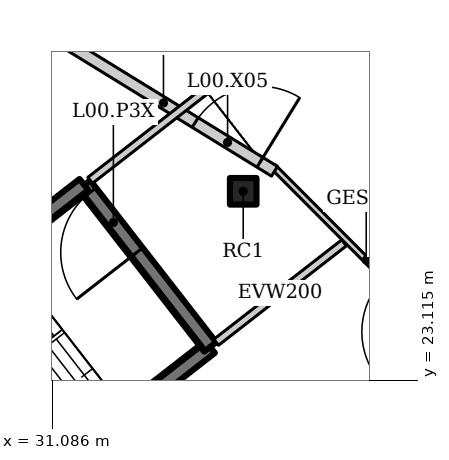
"""IFC4 building model, lengths in metres.
Left out: names, types, materials, properties, quantities, classifications, styles, units other than length and angle.
Written with IfcOpenShell. Run it as: python <this file> out.ifc"""

import sys

from ifc_helpers import new_model, si_unit, direction, frame, frame_2d, origin, origin_2d, place, context, subcontext, project, spatial, rectangle, hollow_rectangle, extrude, element, fill, save


model = new_model("IFC4")
c1 = context("Model", 3, precision=1e-05, world=origin(), true_north=direction((0.0, 1.0)))
c2 = subcontext(c1, "Body", "Model", "MODEL_VIEW")
j1 = project(units=[si_unit("LENGTHUNIT", "METRE"), si_unit("PLANEANGLEUNIT", "RADIAN")], contexts=[c1])
p1 = place(None, origin())
s1 = spatial("IfcSite", under=j1, at=p1, CompositionType="ELEMENT")
p2 = place(p1, origin())
s2 = spatial("IfcBuilding", under=s1, at=p2, CompositionType="ELEMENT")
p3 = place(p2, origin())
s3 = spatial("IfcBuildingStorey", under=s2, at=p3, CompositionType="ELEMENT", Elevation=0.0)
p4 = place(p3, frame((36.108, 28.081, 0.0), z_axis=(0.0, 0.0, 1.0), x_axis=(1.0, 0.0, 0.0)))
e1 = element("IfcColumn", 1, at=p4, inside=s3, PredefinedType="COLUMN", context=c2, shape_type="SweptSolid", body=[
    extrude(hollow_rectangle(XDim=0.7, YDim=0.7, WallThickness=0.04, at=origin_2d()), origin(), (0.0, 0.0, 1.0), 6.5),
])
p5 = place(p3, frame((41.794, 23.815, 0.0), z_axis=(0.0, 0.0, 1.0), x_axis=(-0.705874614645, 0.708336804352, 0.0)))
e2 = element("IfcWall", 2, at=p5, inside=s3, PredefinedType="ELEMENTEDWALL", context=c2, shape_type="SweptSolid", body=[
    extrude(rectangle(XDim=6.941, YDim=0.15, at=frame_2d((3.47, 0.0))), origin(), (0.0, 0.0, 1.0), 6.3),
])
p6 = place(p5, frame((0.8, 0.0, 0.0)))
e3 = element("IfcOpeningElement", 3, at=p6, cuts=e2, PredefinedType="OPENING", context=c2, shape_type="SweptSolid", body=[
    extrude(rectangle(XDim=2.0, YDim=2.4, at=frame_2d((1.0, 1.2))), frame((0.0, 0.085, 0.0), z_axis=(0.0, -1.0, 0.0), x_axis=(1.0, 0.0, 0.0)), (0.0, 0.0, 1.0), 0.17),
])
p7 = place(p3, frame((36.932, 28.608, 0.0), z_axis=(0.0, 0.0, 1.0), x_axis=(-0.851808565246, 0.52385319334, 0.0)))
e4 = element("IfcWall", 4, at=p7, inside=s3, PredefinedType="SOLIDWALL", context=c2, shape_type="SweptSolid", body=[
    extrude(rectangle(XDim=6.861, YDim=0.3, at=frame_2d((3.43, 0.0))), origin(), (0.0, 0.0, 1.0), 6.3),
])
p8 = place(p7, frame((0.45, 0.0, 0.0)))
e5 = element("IfcOpeningElement", 5, at=p8, cuts=e4, PredefinedType="OPENING", context=c2, shape_type="SweptSolid", body=[
    extrude(rectangle(XDim=2.0, YDim=2.1, at=frame_2d((1.0, 1.05))), frame((0.0, 0.16, 0.0), z_axis=(0.0, -1.0, 0.0), x_axis=(1.0, 0.0, 0.0)), (0.0, 0.0, 1.0), 0.32),
])
p9 = place(p3, frame((35.397, 24.108, 0.0), z_axis=(0.0, 0.0, 1.0), x_axis=(0.789352217376, 0.613940613515, 0.0)))
e6 = element("IfcWall", 6, at=p9, inside=s3, PredefinedType="SOLIDWALL", context=c2, shape_type="SweptSolid", body=[
    extrude(rectangle(XDim=4.262, YDim=0.2, at=frame_2d((2.131, 0.0))), origin(), (0.0, 0.0, 1.0), 6.3),
])
p10 = place(p3, frame((32.082, 28.371, 0.0), z_axis=(0.0, 0.0, 1.0), x_axis=(0.789376118937, 0.613909881702, 0.0)))
e7 = element("IfcWall", 7, at=p10, inside=s3, PredefinedType="SOLIDWALL", context=c2, shape_type="SweptSolid", body=[
    extrude(rectangle(XDim=3.85, YDim=0.2, at=frame_2d((1.925, 0.0))), origin(), (0.0, 0.0, 1.0), 6.3),
])
p11 = place(p3, frame((17.291, 17.905, 0.0), z_axis=(0.0, 0.0, 1.0), x_axis=(0.696460684513, 0.717594951855, 0.0)))
e8 = element("IfcWall", 8, at=p11, inside=s3, PredefinedType="SOLIDWALL", context=c2, shape_type="SweptSolid", body=[
    extrude(rectangle(XDim=19.881, YDim=0.2, at=frame_2d((9.94, 0.0))), origin(), (0.0, 0.0, 1.0), 4.8),
])
p12 = place(p3, frame((28.293, 18.583, 0.0), z_axis=(0.0, 0.0, 1.0), x_axis=(0.78938060008, 0.613904119726, 0.0)))
e9 = element("IfcWall", 9, at=p12, inside=s3, PredefinedType="SHEAR", context=c2, shape_type="SweptSolid", body=[
    extrude(rectangle(XDim=8.8, YDim=0.4, at=frame_2d((4.4, 0.0))), origin(), (0.0, 0.0, 1.0), 6.5),
])
p13 = place(p3, frame((35.239, 23.985, 0.0), z_axis=(0.0, 0.0, 1.0), x_axis=(-0.613912443548, 0.789374126544, 0.0)))
e10 = element("IfcWall", 10, at=p13, inside=s3, PredefinedType="SHEAR", context=c2, shape_type="SweptSolid", body=[
    extrude(rectangle(XDim=5.4, YDim=0.4, at=frame_2d((2.7, 0.0))), origin(), (0.0, 0.0, 1.0), 6.5),
])
p14 = place(p13, frame((3.15, 0.0, 0.0)))
e11 = element("IfcOpeningElement", 11, at=p14, cuts=e10, PredefinedType="OPENING", context=c2, shape_type="SweptSolid", body=[
    extrude(rectangle(XDim=2.0, YDim=2.1, at=frame_2d((1.0, 1.05))), frame((0.0, 0.21, 0.0), z_axis=(0.0, -1.0, 0.0), x_axis=(1.0, 0.0, 0.0)), (0.0, 0.0, 1.0), 0.42),
])
p15 = place(p3, frame((31.924, 28.248, 0.0), z_axis=(0.0, 0.0, 1.0), x_axis=(-0.78938060008, -0.613904119726, 0.0)))
e12 = element("IfcWall", 12, at=p15, inside=s3, PredefinedType="SHEAR", context=c2, shape_type="SweptSolid", body=[
    extrude(rectangle(XDim=8.8, YDim=0.4, at=frame_2d((4.4, 0.0))), origin(), (0.0, 0.0, 1.0), 6.5),
])
p16 = place(p8, frame((2.0, 0.0, 0.0), z_axis=(0.0, 0.0, 1.0), x_axis=(-1.0, 0.0, 0.0)))
e13 = element("IfcDoor", 13, at=p16, inside=s3, OperationType="DOUBLE_DOOR_SINGLE_SWING", PredefinedType="DOOR", context=c2, shape_type="SweptSolid", body=[
    extrude(rectangle(XDim=2.0, YDim=2.1, at=frame_2d((1.0, 1.05))), frame((0.0, 0.025, 0.0), z_axis=(0.0, -1.0, 0.0), x_axis=(1.0, 0.0, 0.0)), (0.0, 0.0, 1.0), 0.05),
])
fill(e5, e13)
p17 = place(p14, origin())
e14 = element("IfcDoor", 14, at=p17, inside=s3, OperationType="DOUBLE_DOOR_DOUBLE_SWING", PredefinedType="DOOR", context=c2, shape_type="SweptSolid", body=[
    extrude(rectangle(XDim=2.0, YDim=2.1, at=frame_2d((1.0, 1.05))), frame((0.0, 0.025, 0.0), z_axis=(0.0, -1.0, 0.0), x_axis=(1.0, 0.0, 0.0)), (0.0, 0.0, 1.0), 0.05),
])
fill(e11, e14)
save(model, sys.argv[1])
